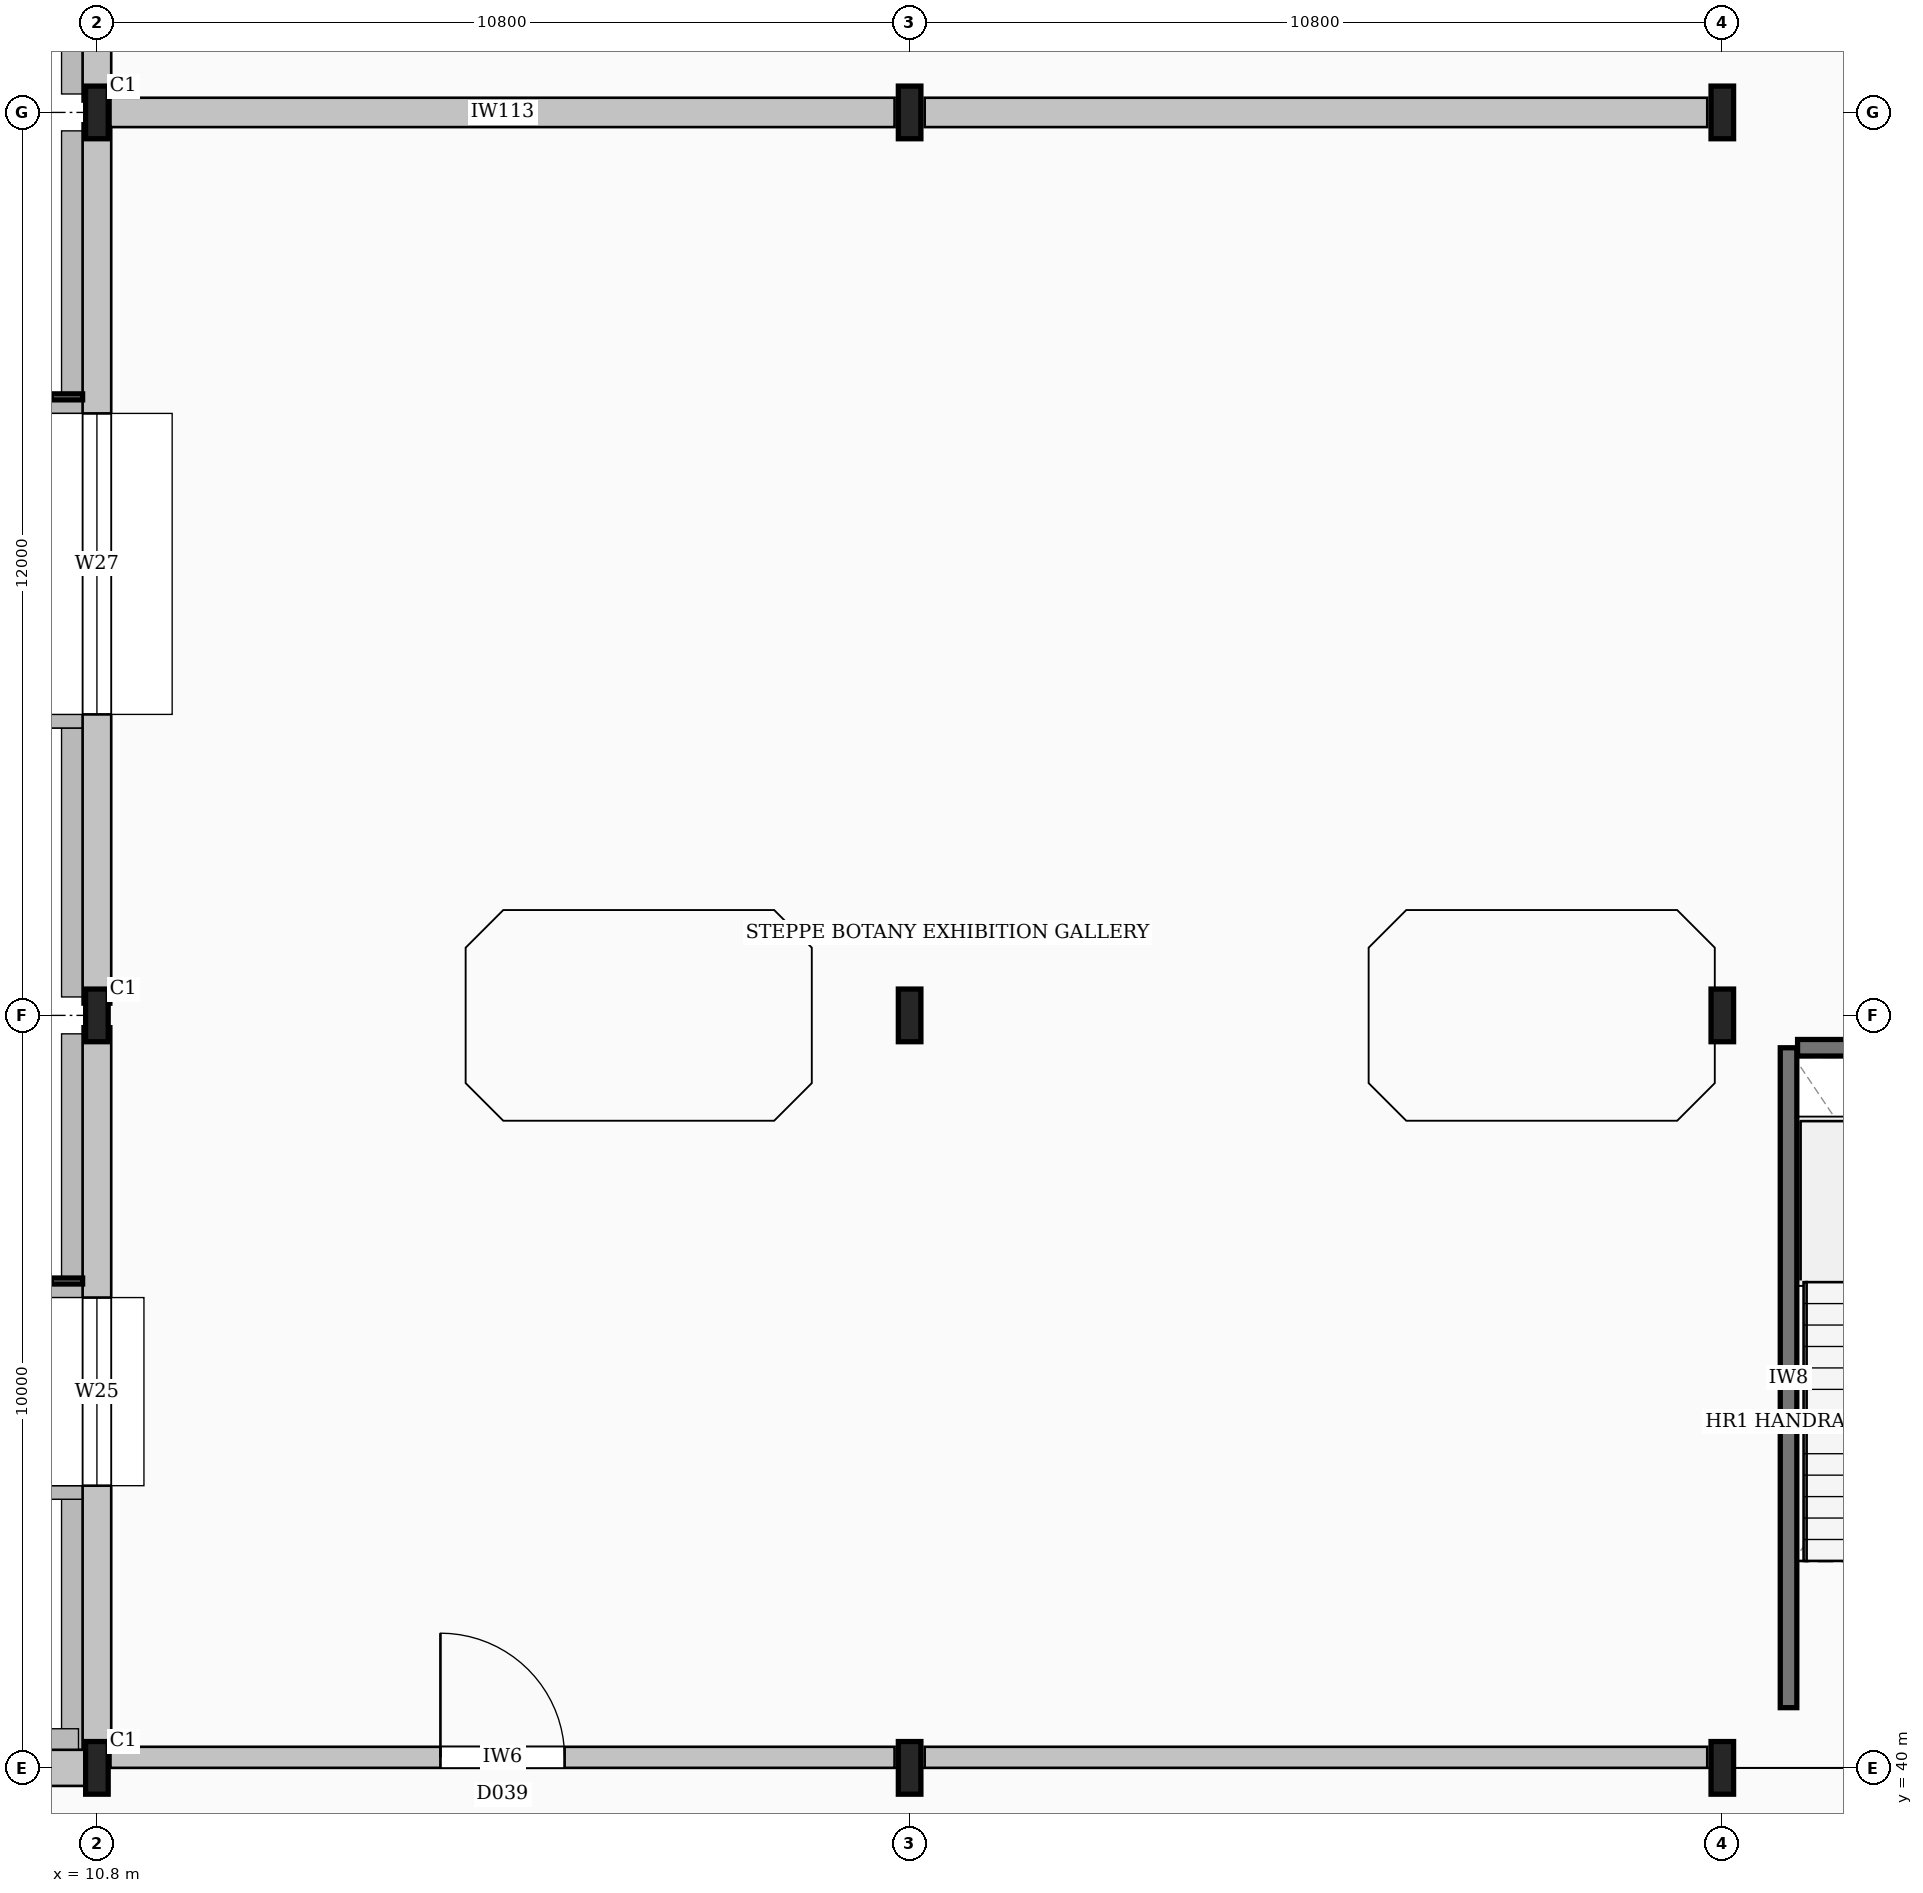
"""IFC4 building model, lengths in metres.
Left out: names, types, materials, properties, quantities, classifications, styles, units other than length and angle.
Written with IfcOpenShell. Run it as: python <this file> out.ifc"""

import sys

from ifc_helpers import new_model, si_unit, direction, frame, frame_2d, origin, origin_2d, place, context, subcontext, project, spatial, rectangle, i_section, extrude, element, fill, save


model = new_model("IFC4")
c1 = context("Model", 3, precision=1e-05, world=origin(), true_north=direction((0.0, 1.0)))
c2 = subcontext(c1, "Body", "Model", "MODEL_VIEW")
j1 = project(units=[si_unit("LENGTHUNIT", "METRE"), si_unit("PLANEANGLEUNIT", "RADIAN")], contexts=[c1])
p1 = place(None, origin())
s1 = spatial("IfcSite", under=j1, at=p1, CompositionType="ELEMENT")
p2 = place(p1, origin())
s2 = spatial("IfcBuilding", under=s1, at=p2, CompositionType="ELEMENT")
p3 = place(p2, frame((0.0, 0.0, 4.8)))
s3 = spatial("IfcBuildingStorey", under=s2, at=p3, CompositionType="ELEMENT", Elevation=4.8)
for number, where, z_axis, x_axis in (
    (1, (10.8, 40.0, 0.0), (0.0, 0.0, 1.0), (1.0, 0.0, 0.0)),
    (2, (10.8, 50.0, 0.0), (0.0, 0.0, 1.0), (1.0, 0.0, 0.0)),
    (3, (10.8, 62.0, 0.0), (0.0, 0.0, 1.0), (1.0, 0.0, 0.0)),
    (4, (21.6, 40.0, 0.0), (0.0, 0.0, 1.0), (1.0, 0.0, 0.0)),
    (5, (21.6, 50.0, 0.0), (0.0, 0.0, 1.0), (1.0, 0.0, 0.0)),
    (6, (21.6, 62.0, 0.0), (0.0, 0.0, 1.0), (1.0, 0.0, 0.0)),
    (7, (32.4, 40.0, 0.0), (0.0, 0.0, 1.0), (1.0, 0.0, 0.0)),
    (8, (32.4, 50.0, 0.0), (0.0, 0.0, 1.0), (1.0, 0.0, 0.0)),
    (9, (32.4, 62.0, 0.0), (0.0, 0.0, 1.0), (1.0, 0.0, 0.0)),
):
    element("IfcColumn", number, at=place(p3, frame(where, z_axis=z_axis, x_axis=x_axis)), inside=s3, PredefinedType="COLUMN", context=c2, shape_type="SweptSolid", body=[
        extrude(i_section(OverallWidth=0.3, OverallDepth=0.7, WebThickness=0.017, FlangeThickness=0.032, FilletRadius=0.027, at=origin_2d()), origin(), (0.0, 0.0, 1.0), 4.8),
    ])
p4 = place(p3, frame((10.8, 71.855, 0.0), z_axis=(0.0, 0.0, 1.0), x_axis=(0.0, -1.0, 0.0)))
e10 = element("IfcWall", 10, at=p4, inside=s3, PredefinedType="STANDARD", context=c2, shape_type="SweptSolid", body=[
    extrude(rectangle(XDim=9.71, YDim=0.38, at=frame_2d((4.855, 0.0))), origin(), (0.0, 0.0, 1.0), 4.04),
])
p5 = place(p4, frame((3.705, 0.0, 1.0)))
e11 = element("IfcOpeningElement", 11, at=p5, cuts=e10, PredefinedType="OPENING", context=c2, shape_type="SweptSolid", body=[
    extrude(rectangle(XDim=2.3, YDim=2.3, at=frame_2d((1.15, 1.15))), frame((0.0, 0.2, 0.0), z_axis=(0.0, -1.0, 0.0), x_axis=(1.0, 0.0, 0.0)), (0.0, 0.0, 1.0), 0.4),
])
p6 = place(p3, frame((10.8, 61.855, 0.0), z_axis=(0.0, 0.0, 1.0), x_axis=(0.0, -1.0, 0.0)))
e12 = element("IfcWall", 12, at=p6, inside=s3, PredefinedType="STANDARD", context=c2, shape_type="SweptSolid", body=[
    extrude(rectangle(XDim=11.71, YDim=0.38, at=frame_2d((5.855, 0.0))), origin(), (0.0, 0.0, 1.0), 3.939),
])
p7 = place(p6, frame((3.855, 0.0, 1.0)))
e13 = element("IfcOpeningElement", 13, at=p7, cuts=e12, PredefinedType="OPENING", context=c2, shape_type="SweptSolid", body=[
    extrude(rectangle(XDim=4.0, YDim=2.6, at=frame_2d((2.0, 1.3))), frame((0.0, 0.2, 0.0), z_axis=(0.0, -1.0, 0.0), x_axis=(1.0, 0.0, 0.0)), (0.0, 0.0, 1.0), 0.4),
])
p8 = place(p3, frame((10.8, 49.855, 0.0), z_axis=(0.0, 0.0, 1.0), x_axis=(0.0, -1.0, 0.0)))
e14 = element("IfcWall", 14, at=p8, inside=s3, PredefinedType="STANDARD", context=c2, shape_type="SweptSolid", body=[
    extrude(rectangle(XDim=9.71, YDim=0.38, at=frame_2d((4.855, 0.0))), origin(), (0.0, 0.0, 1.0), 4.04),
])
p9 = place(p8, frame((3.605, 0.0, 1.0)))
e15 = element("IfcOpeningElement", 15, at=p9, cuts=e14, PredefinedType="OPENING", context=c2, shape_type="SweptSolid", body=[
    extrude(rectangle(XDim=2.5, YDim=1.7, at=frame_2d((1.25, 0.85))), frame((0.0, 0.2, 0.0), z_axis=(0.0, -1.0, 0.0), x_axis=(1.0, 0.0, 0.0)), (0.0, 0.0, 1.0), 0.4),
])
p10 = place(p3, frame((10.655, 40.0, 0.0), z_axis=(0.0, 0.0, 1.0), x_axis=(-1.0, 0.0, 0.0)))
e16 = element("IfcWall", 16, at=p10, inside=s3, PredefinedType="STANDARD", context=c2, shape_type="SweptSolid", body=[
    extrude(rectangle(XDim=10.51, YDim=0.48, at=frame_2d((5.255, 0.0))), origin(), (0.0, 0.0, 1.0), 3.939),
])
p11 = place(p10, frame((3.355, 0.0, 1.0)))
e17 = element("IfcOpeningElement", 17, at=p11, cuts=e16, PredefinedType="OPENING", context=c2, shape_type="SweptSolid", body=[
    extrude(rectangle(XDim=3.8, YDim=2.1, at=frame_2d((1.9, 1.05))), frame((0.0, 0.25, 0.0), z_axis=(0.0, -1.0, 0.0), x_axis=(1.0, 0.0, 0.0)), (0.0, 0.0, 1.0), 0.5),
])
p12 = place(p3, frame((33.28, 40.8, 0.0), z_axis=(0.0, 0.0, 1.0), x_axis=(0.0, 1.0, 0.0)))
e18 = element("IfcWall", 18, at=p12, inside=s3, PredefinedType="SHEAR", context=c2, shape_type="SweptSolid", body=[
    extrude(rectangle(XDim=8.77, YDim=0.22, at=frame_2d((4.385, 0.0))), origin(), (0.0, 0.0, 1.0), 4.56),
])
p13 = place(p3, frame((33.4, 49.57, 0.0), z_axis=(0.0, 0.0, 1.0), x_axis=(1.0, 0.0, 0.0)))
e19 = element("IfcWall", 19, at=p13, inside=s3, PredefinedType="SHEAR", context=c2, shape_type="SweptSolid", body=[
    extrude(rectangle(XDim=4.4, YDim=0.22, at=frame_2d((2.2, 0.0))), origin(), (0.0, 0.0, 1.0), 4.56),
])
p14 = place(p3, frame((10.98, 40.14, 0.0), z_axis=(0.0, 0.0, 1.0), x_axis=(1.0, 0.0, 0.0)))
e20 = element("IfcWall", 20, at=p14, inside=s3, PredefinedType="SOLIDWALL", context=c2, shape_type="SweptSolid", body=[
    extrude(rectangle(XDim=10.42, YDim=0.28, at=frame_2d((5.21, 0.0))), origin(), (0.0, 0.0, 1.0), 3.939),
])
p15 = place(p14, frame((4.385, 0.0, 0.0)))
e21 = element("IfcOpeningElement", 21, at=p15, cuts=e20, PredefinedType="OPENING", context=c2, shape_type="SweptSolid", body=[
    extrude(rectangle(XDim=1.65, YDim=2.4, at=frame_2d((0.825, 1.2))), frame((0.0, 0.15, 0.0), z_axis=(0.0, -1.0, 0.0), x_axis=(1.0, 0.0, 0.0)), (0.0, 0.0, 1.0), 0.3),
])
p16 = place(p3, frame((21.8, 40.14, 0.0), z_axis=(0.0, 0.0, 1.0), x_axis=(1.0, 0.0, 0.0)))
e22 = element("IfcWall", 22, at=p16, inside=s3, PredefinedType="SOLIDWALL", context=c2, shape_type="SweptSolid", body=[
    extrude(rectangle(XDim=10.4, YDim=0.28, at=frame_2d((5.2, 0.0))), origin(), (0.0, 0.0, 1.0), 3.939),
])
p17 = place(p3, frame((10.98, 62.0, 0.0), z_axis=(0.0, 0.0, 1.0), x_axis=(1.0, 0.0, 0.0)))
e23 = element("IfcWall", 23, at=p17, inside=s3, PredefinedType="PARTITIONING", context=c2, shape_type="SweptSolid", body=[
    extrude(rectangle(XDim=10.42, YDim=0.39, at=frame_2d((5.21, 0.0))), origin(), (0.0, 0.0, 1.0), 3.939),
])
p18 = place(p3, frame((21.8, 62.0, 0.0), z_axis=(0.0, 0.0, 1.0), x_axis=(1.0, 0.0, 0.0)))
e24 = element("IfcWall", 24, at=p18, inside=s3, PredefinedType="PARTITIONING", context=c2, shape_type="SweptSolid", body=[
    extrude(rectangle(XDim=10.4, YDim=0.39, at=frame_2d((5.2, 0.0))), origin(), (0.0, 0.0, 1.0), 3.939),
])
p19 = place(p7, origin())
e25 = element("IfcWindow", 25, at=p19, inside=s3, PartitioningType="SINGLE_PANEL", PredefinedType="WINDOW", context=c2, shape_type="SweptSolid", body=[
    extrude(rectangle(XDim=4.0, YDim=2.6, at=frame_2d((2.0, 1.3))), frame((0.0, 0.03, 0.0), z_axis=(0.0, -1.0, 0.0), x_axis=(1.0, 0.0, 0.0)), (0.0, 0.0, 1.0), 0.06),
])
fill(e13, e25)
p20 = place(p9, origin())
e26 = element("IfcWindow", 26, at=p20, inside=s3, PartitioningType="SINGLE_PANEL", PredefinedType="WINDOW", context=c2, shape_type="SweptSolid", body=[
    extrude(rectangle(XDim=2.5, YDim=1.7, at=frame_2d((1.25, 0.85))), frame((0.0, 0.03, 0.0), z_axis=(0.0, -1.0, 0.0), x_axis=(1.0, 0.0, 0.0)), (0.0, 0.0, 1.0), 0.06),
])
fill(e15, e26)
p21 = place(p15, origin())
e27 = element("IfcDoor", 27, at=p21, inside=s3, OperationType="SINGLE_SWING_LEFT", PredefinedType="DOOR", context=c2, shape_type="SweptSolid", body=[
    extrude(rectangle(XDim=1.65, YDim=2.4, at=frame_2d((0.825, 1.2))), frame((0.0, 0.025, 0.0), z_axis=(0.0, -1.0, 0.0), x_axis=(1.0, 0.0, 0.0)), (0.0, 0.0, 1.0), 0.05),
])
fill(e21, e27)
save(model, sys.argv[1])
